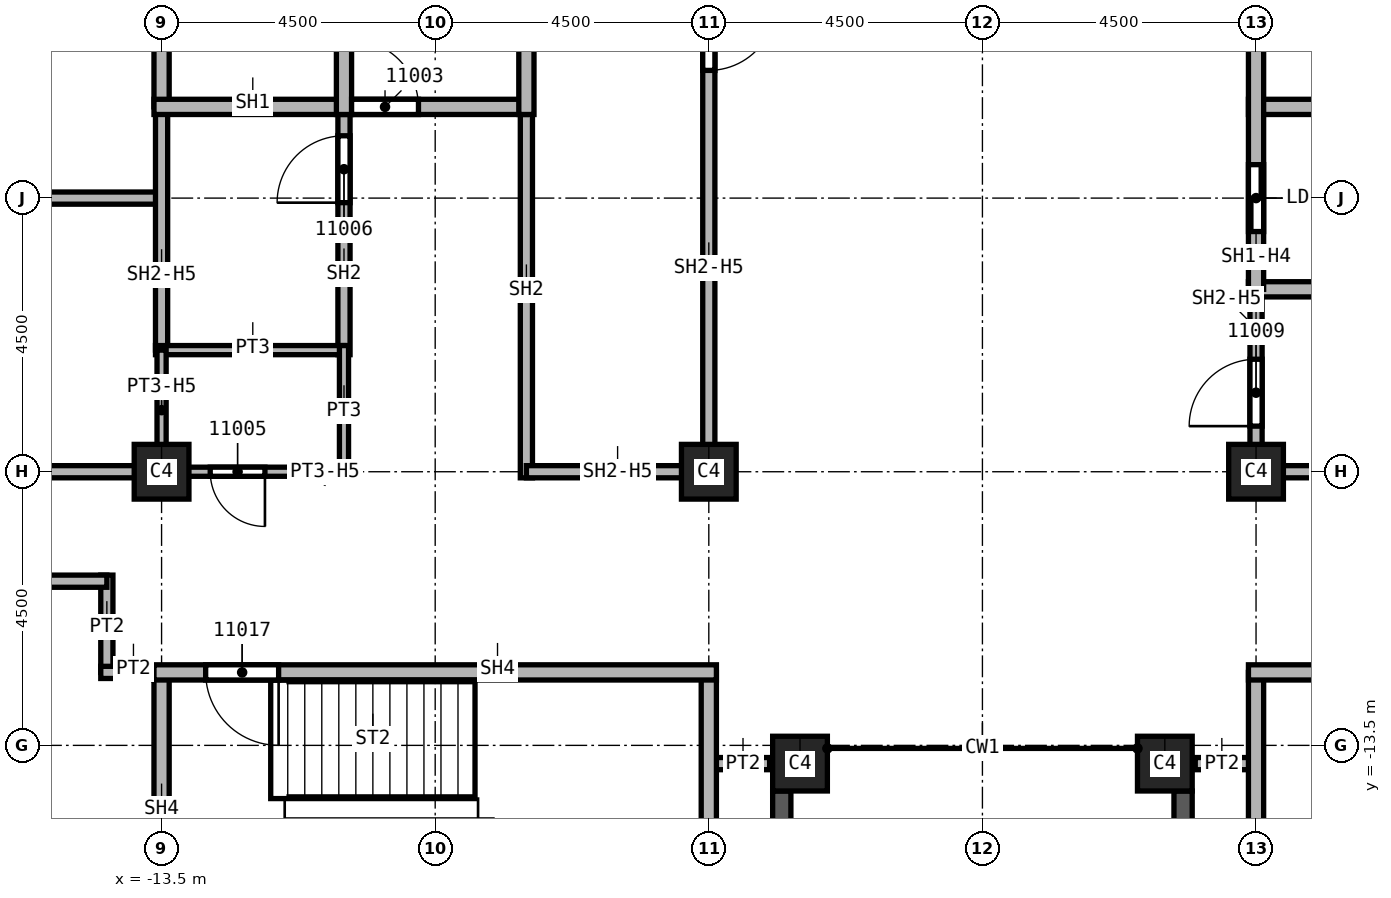
"""IFC4 building model, lengths in metres.
Left out: names, types, materials, properties, quantities, classifications, styles, units other than length and angle.
Written with IfcOpenShell. Run it as: python <this file> out.ifc"""

import sys

from ifc_helpers import new_model, si_unit, direction, frame, frame_2d, origin, origin_2d, place, context, subcontext, project, spatial, rectangle, extrude, element, fill, save


model = new_model("IFC4")
c1 = context("Model", 3, precision=1e-05, world=origin(), true_north=direction((0.0, 1.0)))
c2 = subcontext(c1, "Body", "Model", "MODEL_VIEW")
j1 = project(units=[si_unit("LENGTHUNIT", "METRE"), si_unit("PLANEANGLEUNIT", "RADIAN")], contexts=[c1])
p1 = place(None, origin())
s1 = spatial("IfcSite", under=j1, at=p1, CompositionType="ELEMENT")
p2 = place(p1, origin())
s2 = spatial("IfcBuilding", under=s1, at=p2, CompositionType="ELEMENT")
p3 = place(p2, frame((0.0, 0.0, 188.0)))
s3 = spatial("IfcBuildingStorey", under=s2, at=p3, CompositionType="ELEMENT", Elevation=188.0)
for number, where, z_axis, x_axis in (
    (1, (4.5, -9.0, 0.0), (0.0, 0.0, 1.0), (1.0, 0.0, 0.0)),
    (2, (-4.5, -9.0, 0.0), (0.0, 0.0, 1.0), (1.0, 0.0, 0.0)),
    (3, (-13.5, -9.0, 0.0), (0.0, 0.0, 1.0), (1.0, 0.0, 0.0)),
    (4, (3.0, -13.8, 0.0), (0.0, 0.0, 1.0), (1.0, 0.0, 0.0)),
    (5, (-3.0, -13.8, 0.0), (0.0, 0.0, 1.0), (1.0, 0.0, 0.0)),
):
    element("IfcColumn", number, at=place(p3, frame(where, z_axis=z_axis, x_axis=x_axis)), inside=s3, PredefinedType="COLUMN", context=c2, shape_type="SweptSolid", body=[
        extrude(rectangle(XDim=0.9, YDim=0.9, at=origin_2d()), origin(), (0.0, 0.0, 1.0), 3.72),
    ])
p4 = place(p3, frame((-3.3, -22.3, 0.0), z_axis=(0.0, 0.0, 1.0), x_axis=(0.0, 1.0, 0.0)))
e6 = element("IfcWall", 6, at=p4, inside=s3, PredefinedType="SOLIDWALL", context=c2, shape_type="SweptSolid", body=[
    extrude(rectangle(XDim=8.05, YDim=0.3, at=frame_2d((4.025, 0.0))), origin(), (0.0, 0.0, 1.0), 3.12),
])
p5 = place(p4, frame((0.812, 0.0, 0.8)))
e7 = element("IfcOpeningElement", 7, at=p5, cuts=e6, PredefinedType="OPENING", context=c2, shape_type="SweptSolid", body=[
    extrude(rectangle(XDim=2.4, YDim=1.95, at=frame_2d((1.2, 0.975))), frame((0.0, 0.15, 0.0), z_axis=(0.0, -1.0, 0.0), x_axis=(1.0, 0.0, 0.0)), (0.0, 0.0, 1.0), 0.3),
])
p6 = place(p4, frame((4.837, 0.0, 0.8)))
e8 = element("IfcOpeningElement", 8, at=p6, cuts=e6, PredefinedType="OPENING", context=c2, shape_type="SweptSolid", body=[
    extrude(rectangle(XDim=2.4, YDim=1.95, at=frame_2d((1.2, 0.975))), frame((0.0, 0.15, 0.0), z_axis=(0.0, -1.0, 0.0), x_axis=(1.0, 0.0, 0.0)), (0.0, 0.0, 1.0), 0.3),
])
p7 = place(p3, frame((3.3, -14.25, 0.0), z_axis=(0.0, 0.0, 1.0), x_axis=(0.0, -1.0, 0.0)))
e9 = element("IfcWall", 9, at=p7, inside=s3, PredefinedType="SOLIDWALL", context=c2, shape_type="SweptSolid", body=[
    extrude(rectangle(XDim=8.05, YDim=0.3, at=frame_2d((4.025, 0.0))), origin(), (0.0, 0.0, 1.0), 3.12),
])
p8 = place(p7, frame((0.812, 0.0, 0.8)))
e10 = element("IfcOpeningElement", 10, at=p8, cuts=e9, PredefinedType="OPENING", context=c2, shape_type="SweptSolid", body=[
    extrude(rectangle(XDim=2.4, YDim=1.95, at=frame_2d((1.2, 0.975))), frame((0.0, 0.15, 0.0), z_axis=(0.0, -1.0, 0.0), x_axis=(1.0, 0.0, 0.0)), (0.0, 0.0, 1.0), 0.3),
])
p9 = place(p7, frame((4.837, 0.0, 0.8)))
e11 = element("IfcOpeningElement", 11, at=p9, cuts=e9, PredefinedType="OPENING", context=c2, shape_type="SweptSolid", body=[
    extrude(rectangle(XDim=2.4, YDim=1.95, at=frame_2d((1.2, 0.975))), frame((0.0, 0.15, 0.0), z_axis=(0.0, -1.0, 0.0), x_axis=(1.0, 0.0, 0.0)), (0.0, 0.0, 1.0), 0.3),
])
for number, where, z_axis, x_axis in (
    (12, (-18.0, -9.0, 0.0), (0.0, 0.0, 1.0), (1.0, 0.0, 0.0)),
    (13, (-18.0, -4.5, 0.0), (0.0, 0.0, 1.0), (1.0, 0.0, 0.0)),
):
    element("IfcWall", number, at=place(p3, frame(where, z_axis=z_axis, x_axis=x_axis)), inside=s3, PredefinedType="PARTITIONING", context=c2, shape_type="SweptSolid", body=[
        extrude(rectangle(XDim=4.5, YDim=0.2, at=frame_2d((2.25, 0.0))), origin(), (0.0, 0.0, 1.0), 3.72),
    ])
p10 = place(p3, frame((-14.4, -12.3, 0.0), z_axis=(0.0, 0.0, 1.0), x_axis=(0.0, 1.0, 0.0)))
e14 = element("IfcWall", 14, at=p10, inside=s3, PredefinedType="PARTITIONING", context=c2, shape_type="SweptSolid", body=[
    extrude(rectangle(XDim=1.6, YDim=0.2, at=frame_2d((0.8, 0.0))), origin(), (0.0, 0.0, 1.0), 3.72),
])
p11 = place(p3, frame((-14.4, -10.8, 0.0), z_axis=(0.0, 0.0, 1.0), x_axis=(-1.0, 0.0, 0.0)))
e15 = element("IfcWall", 15, at=p11, inside=s3, PredefinedType="PARTITIONING", context=c2, shape_type="SweptSolid", body=[
    extrude(rectangle(XDim=3.6, YDim=0.2, at=frame_2d((1.8, 0.0))), origin(), (0.0, 0.0, 1.0), 3.72),
])
p12 = place(p3, frame((-13.375, -12.3, 0.0), z_axis=(0.0, 0.0, 1.0), x_axis=(-1.0, 0.0, 0.0)))
e16 = element("IfcWall", 16, at=p12, inside=s3, PredefinedType="PARTITIONING", context=c2, shape_type="SweptSolid", body=[
    extrude(rectangle(XDim=1.125, YDim=0.2, at=frame_2d((0.562, 0.0))), origin(), (0.0, 0.0, 1.0), 3.72),
])
for number, where, z_axis, x_axis in (
    (17, (-3.5, -13.8, 0.0), (0.0, 0.0, 1.0), (-1.0, 0.0, 0.0)),
    (18, (4.5, -13.8, 0.0), (0.0, 0.0, 1.0), (-1.0, 0.0, 0.0)),
):
    element("IfcWall", number, at=place(p3, frame(where, z_axis=z_axis, x_axis=x_axis)), inside=s3, PredefinedType="PARTITIONING", context=c2, shape_type="SweptSolid", body=[
        extrude(rectangle(XDim=1.0, YDim=0.2, at=frame_2d((0.5, 0.0))), origin(), (0.0, 0.0, 1.0), 3.72),
    ])
p13 = place(p3, frame((-13.5, -7.0, 0.0), z_axis=(0.0, 0.0, 1.0), x_axis=(0.0, 1.0, 0.0)))
e19 = element("IfcWall", 19, at=p13, inside=s3, PredefinedType="SOLIDWALL", context=c2, shape_type="SweptSolid", body=[
    extrude(rectangle(XDim=4.0, YDim=0.2, at=frame_2d((2.0, 0.0))), origin(), (0.0, 0.0, 1.0), 2.958),
])
p14 = place(p3, frame((-10.5, -7.075, 0.0), z_axis=(0.0, 0.0, 1.0), x_axis=(0.0, 1.0, 0.0)))
e20 = element("IfcWall", 20, at=p14, inside=s3, PredefinedType="SOLIDWALL", context=c2, shape_type="SweptSolid", body=[
    extrude(rectangle(XDim=4.2, YDim=0.2, at=frame_2d((2.1, 0.0))), origin(), (0.0, 0.0, 1.0), 3.72),
])
p15 = place(p14, frame((2.5, 0.0, 0.0)))
e21 = element("IfcOpeningElement", 21, at=p15, cuts=e20, PredefinedType="OPENING", context=c2, shape_type="SweptSolid", body=[
    extrude(rectangle(XDim=1.1, YDim=2.1, at=frame_2d((0.55, 1.05))), frame((0.0, 0.1, 0.0), z_axis=(0.0, -1.0, 0.0), x_axis=(1.0, 0.0, 0.0)), (0.0, 0.0, 1.0), 0.2),
])
p16 = place(p3, frame((-7.5, -9.1, 0.0), z_axis=(0.0, 0.0, 1.0), x_axis=(0.0, 1.0, 0.0)))
e22 = element("IfcWall", 22, at=p16, inside=s3, PredefinedType="SOLIDWALL", context=c2, shape_type="SweptSolid", body=[
    extrude(rectangle(XDim=6.225, YDim=0.2, at=frame_2d((3.113, 0.0))), origin(), (0.0, 0.0, 1.0), 3.72),
])
p17 = place(p3, frame((-4.5, -9.0, 0.0), z_axis=(0.0, 0.0, 1.0), x_axis=(-1.0, 0.0, 0.0)))
e23 = element("IfcWall", 23, at=p17, inside=s3, PredefinedType="SOLIDWALL", context=c2, shape_type="SweptSolid", body=[
    extrude(rectangle(XDim=3.0, YDim=0.2, at=frame_2d((1.5, 0.0))), origin(), (0.0, 0.0, 1.0), 2.958),
])
p18 = place(p3, frame((-4.5, 0.0, 0.0), z_axis=(0.0, 0.0, 1.0), x_axis=(0.0, -1.0, 0.0)))
e24 = element("IfcWall", 24, at=p18, inside=s3, PredefinedType="SOLIDWALL", context=c2, shape_type="SweptSolid", body=[
    extrude(rectangle(XDim=9.1, YDim=0.2, at=frame_2d((4.55, 0.0))), origin(), (0.0, 0.0, 1.0), 2.958),
])
p19 = place(p18, frame((1.3, 0.0, 0.0)))
e25 = element("IfcOpeningElement", 25, at=p19, cuts=e24, PredefinedType="OPENING", context=c2, shape_type="SweptSolid", body=[
    extrude(rectangle(XDim=1.1, YDim=2.1, at=frame_2d((0.55, 1.05))), frame((0.0, 0.1, 0.0), z_axis=(0.0, -1.0, 0.0), x_axis=(1.0, 0.0, 0.0)), (0.0, 0.0, 1.0), 0.2),
])
p20 = place(p3, frame((4.5, -9.1, 0.0), z_axis=(0.0, 0.0, 1.0), x_axis=(0.0, 1.0, 0.0)))
e26 = element("IfcWall", 26, at=p20, inside=s3, PredefinedType="SOLIDWALL", context=c2, shape_type="SweptSolid", body=[
    extrude(rectangle(XDim=3.1, YDim=0.2, at=frame_2d((1.55, 0.0))), origin(), (0.0, 0.0, 1.0), 2.958),
])
p21 = place(p20, frame((0.85, 0.0, 0.0)))
e27 = element("IfcOpeningElement", 27, at=p21, cuts=e26, PredefinedType="OPENING", context=c2, shape_type="SweptSolid", body=[
    extrude(rectangle(XDim=1.1, YDim=2.1, at=frame_2d((0.55, 1.05))), frame((0.0, 0.1, 0.0), z_axis=(0.0, -1.0, 0.0), x_axis=(1.0, 0.0, 0.0)), (0.0, 0.0, 1.0), 0.2),
])
p22 = place(p3, frame((7.5, -9.0, 0.0), z_axis=(0.0, 0.0, 1.0), x_axis=(-1.0, 0.0, 0.0)))
e28 = element("IfcWall", 28, at=p22, inside=s3, PredefinedType="SOLIDWALL", context=c2, shape_type="SweptSolid", body=[
    extrude(rectangle(XDim=3.0, YDim=0.2, at=frame_2d((1.5, 0.0))), origin(), (0.0, 0.0, 1.0), 2.958),
])
p23 = place(p3, frame((-13.5, -3.0, 0.0), z_axis=(0.0, 0.0, 1.0), x_axis=(0.0, 1.0, 0.0)))
e29 = element("IfcWall", 29, at=p23, inside=s3, PredefinedType="SOLIDWALL", context=c2, shape_type="SweptSolid", body=[
    extrude(rectangle(XDim=6.0, YDim=0.25, at=frame_2d((3.0, 0.0))), origin(), (0.0, 0.0, 1.0), 2.958),
])
p24 = place(p3, frame((-13.625, -3.0, 0.0), z_axis=(0.0, 0.0, 1.0), x_axis=(1.0, 0.0, 0.0)))
e30 = element("IfcWall", 30, at=p24, inside=s3, PredefinedType="SOLIDWALL", context=c2, shape_type="SweptSolid", body=[
    extrude(rectangle(XDim=6.125, YDim=0.25, at=frame_2d((3.062, 0.0))), origin(), (0.0, 0.0, 1.0), 3.72),
])
p25 = place(p24, frame((3.25, 0.0, 0.0)))
e31 = element("IfcOpeningElement", 31, at=p25, cuts=e30, PredefinedType="OPENING", context=c2, shape_type="SweptSolid", body=[
    extrude(rectangle(XDim=1.1, YDim=2.1, at=frame_2d((0.55, 1.05))), frame((0.0, 0.125, 0.0), z_axis=(0.0, -1.0, 0.0), x_axis=(1.0, 0.0, 0.0)), (0.0, 0.0, 1.0), 0.25),
])
p26 = place(p3, frame((-10.5, -3.125, 0.0), z_axis=(0.0, 0.0, 1.0), x_axis=(0.0, 1.0, 0.0)))
e32 = element("IfcWall", 32, at=p26, inside=s3, PredefinedType="SOLIDWALL", context=c2, shape_type="SweptSolid", body=[
    extrude(rectangle(XDim=6.25, YDim=0.25, at=frame_2d((3.125, 0.0))), origin(), (0.0, 0.0, 1.0), 3.72),
])
p27 = place(p26, frame((1.075, 0.0, 0.0)))
e33 = element("IfcOpeningElement", 33, at=p27, cuts=e32, PredefinedType="OPENING", context=c2, shape_type="SweptSolid", body=[
    extrude(rectangle(XDim=1.1, YDim=2.1, at=frame_2d((0.55, 1.05))), frame((0.0, 0.125, 0.0), z_axis=(0.0, -1.0, 0.0), x_axis=(1.0, 0.0, 0.0)), (0.0, 0.0, 1.0), 0.25),
])
p28 = place(p26, frame((4.075, 0.0, 0.0)))
e34 = element("IfcOpeningElement", 34, at=p28, cuts=e32, PredefinedType="OPENING", context=c2, shape_type="SweptSolid", body=[
    extrude(rectangle(XDim=1.1, YDim=2.1, at=frame_2d((0.55, 1.05))), frame((0.0, 0.125, 0.0), z_axis=(0.0, -1.0, 0.0), x_axis=(1.0, 0.0, 0.0)), (0.0, 0.0, 1.0), 0.25),
])
p29 = place(p3, frame((-7.5, -3.125, 0.0), z_axis=(0.0, 0.0, 1.0), x_axis=(0.0, 1.0, 0.0)))
e35 = element("IfcWall", 35, at=p29, inside=s3, PredefinedType="SOLIDWALL", context=c2, shape_type="SweptSolid", body=[
    extrude(rectangle(XDim=9.125, YDim=0.25, at=frame_2d((4.562, 0.0))), origin(), (0.0, 0.0, 1.0), 3.72),
])
p30 = place(p3, frame((4.375, -6.0, 0.0), z_axis=(0.0, 0.0, 1.0), x_axis=(1.0, 0.0, 0.0)))
e36 = element("IfcWall", 36, at=p30, inside=s3, PredefinedType="SOLIDWALL", context=c2, shape_type="SweptSolid", body=[
    extrude(rectangle(XDim=3.25, YDim=0.25, at=frame_2d((1.625, 0.0))), origin(), (0.0, 0.0, 1.0), 3.72),
])
p31 = place(p3, frame((4.375, -3.0, 0.0), z_axis=(0.0, 0.0, 1.0), x_axis=(1.0, 0.0, 0.0)))
e37 = element("IfcWall", 37, at=p31, inside=s3, PredefinedType="SOLIDWALL", context=c2, shape_type="SweptSolid", body=[
    extrude(rectangle(XDim=9.25, YDim=0.25, at=frame_2d((4.625, 0.0))), origin(), (0.0, 0.0, 1.0), 3.72),
])
p32 = place(p31, frame((4.125, 0.0, 0.0)))
e38 = element("IfcOpeningElement", 38, at=p32, cuts=e37, PredefinedType="OPENING", context=c2, shape_type="SweptSolid", body=[
    extrude(rectangle(XDim=1.1, YDim=2.1, at=frame_2d((0.55, 1.05))), frame((0.0, 0.125, 0.0), z_axis=(0.0, -1.0, 0.0), x_axis=(1.0, 0.0, 0.0)), (0.0, 0.0, 1.0), 0.25),
])
p33 = place(p3, frame((4.5, -6.0, 0.0), z_axis=(0.0, 0.0, 1.0), x_axis=(0.0, 1.0, 0.0)))
e39 = element("IfcWall", 39, at=p33, inside=s3, PredefinedType="SOLIDWALL", context=c2, shape_type="SweptSolid", body=[
    extrude(rectangle(XDim=6.0, YDim=0.25, at=frame_2d((3.0, 0.0))), origin(), (0.0, 0.0, 1.0), 2.958),
])
p34 = place(p33, frame((0.95, 0.0, 0.0)))
e40 = element("IfcOpeningElement", 40, at=p34, cuts=e39, PredefinedType="OPENING", context=c2, shape_type="SweptSolid", body=[
    extrude(rectangle(XDim=1.1, YDim=2.1, at=frame_2d((0.55, 1.05))), frame((0.0, 0.125, 0.0), z_axis=(0.0, -1.0, 0.0), x_axis=(1.0, 0.0, 0.0)), (0.0, 0.0, 1.0), 0.25),
])
p35 = place(p33, frame((3.95, 0.0, 0.0)))
e41 = element("IfcOpeningElement", 41, at=p35, cuts=e39, PredefinedType="OPENING", context=c2, shape_type="SweptSolid", body=[
    extrude(rectangle(XDim=1.1, YDim=2.1, at=frame_2d((0.55, 1.05))), frame((0.0, 0.125, 0.0), z_axis=(0.0, -1.0, 0.0), x_axis=(1.0, 0.0, 0.0)), (0.0, 0.0, 1.0), 0.25),
])
p36 = place(p3, frame((-13.5, -16.8, 0.0), z_axis=(0.0, 0.0, 1.0), x_axis=(0.0, 1.0, 0.0)))
e42 = element("IfcWall", 42, at=p36, inside=s3, PredefinedType="SOLIDWALL", context=c2, shape_type="SweptSolid", body=[
    extrude(rectangle(XDim=4.5, YDim=0.25, at=frame_2d((2.25, 0.0))), origin(), (0.0, 0.0, 1.0), 3.72),
])
p37 = place(p3, frame((-4.5, -12.3, 0.0), z_axis=(0.0, 0.0, 1.0), x_axis=(0.0, -1.0, 0.0)))
e43 = element("IfcWall", 43, at=p37, inside=s3, PredefinedType="SOLIDWALL", context=c2, shape_type="SweptSolid", body=[
    extrude(rectangle(XDim=4.625, YDim=0.25, at=frame_2d((2.312, 0.0))), origin(), (0.0, 0.0, 1.0), 3.72),
])
p38 = place(p3, frame((-4.375, -12.3, 0.0), z_axis=(0.0, 0.0, 1.0), x_axis=(-1.0, 0.0, 0.0)))
e44 = element("IfcWall", 44, at=p38, inside=s3, PredefinedType="SOLIDWALL", context=c2, shape_type="SweptSolid", body=[
    extrude(rectangle(XDim=9.25, YDim=0.25, at=frame_2d((4.625, 0.0))), origin(), (0.0, 0.0, 1.0), 3.72),
])
p39 = place(p38, frame((7.2, 0.0, 0.0)))
e45 = element("IfcOpeningElement", 45, at=p39, cuts=e44, PredefinedType="OPENING", context=c2, shape_type="SweptSolid", body=[
    extrude(rectangle(XDim=1.2, YDim=2.1, at=frame_2d((0.6, 1.05))), frame((0.0, 0.125, 0.0), z_axis=(0.0, -1.0, 0.0), x_axis=(1.0, 0.0, 0.0)), (0.0, 0.0, 1.0), 0.25),
])
p40 = place(p3, frame((4.5, -16.8, 0.0), z_axis=(0.0, 0.0, 1.0), x_axis=(0.0, 1.0, 0.0)))
e46 = element("IfcWall", 46, at=p40, inside=s3, PredefinedType="SOLIDWALL", context=c2, shape_type="SweptSolid", body=[
    extrude(rectangle(XDim=4.5, YDim=0.25, at=frame_2d((2.25, 0.0))), origin(), (0.0, 0.0, 1.0), 3.72),
])
p41 = place(p3, frame((13.625, -12.3, 0.0), z_axis=(0.0, 0.0, 1.0), x_axis=(-1.0, 0.0, 0.0)))
e47 = element("IfcWall", 47, at=p41, inside=s3, PredefinedType="SOLIDWALL", context=c2, shape_type="SweptSolid", body=[
    extrude(rectangle(XDim=9.25, YDim=0.25, at=frame_2d((4.625, 0.0))), origin(), (0.0, 0.0, 1.0), 3.72),
])
p42 = place(p41, frame((0.85, 0.0, 0.0)))
e48 = element("IfcOpeningElement", 48, at=p42, cuts=e47, PredefinedType="OPENING", context=c2, shape_type="SweptSolid", body=[
    extrude(rectangle(XDim=1.2, YDim=2.1, at=frame_2d((0.6, 1.05))), frame((0.0, 0.125, 0.0), z_axis=(0.0, -1.0, 0.0), x_axis=(1.0, 0.0, 0.0)), (0.0, 0.0, 1.0), 0.25),
])
p43 = place(p3, frame((-13.6, -7.0, 0.0), z_axis=(0.0, 0.0, 1.0), x_axis=(1.0, 0.0, 0.0)))
e49 = element("IfcWall", 49, at=p43, inside=s3, PredefinedType="PARTITIONING", context=c2, shape_type="SweptSolid", body=[
    extrude(rectangle(XDim=3.1, YDim=0.15, at=frame_2d((1.55, 0.0))), origin(), (0.0, 0.0, 1.0), 3.72),
])
p44 = place(p3, frame((-13.5, -9.1, 0.0), z_axis=(0.0, 0.0, 1.0), x_axis=(0.0, 1.0, 0.0)))
e50 = element("IfcWall", 50, at=p44, inside=s3, PredefinedType="PARTITIONING", context=c2, shape_type="SweptSolid", body=[
    extrude(rectangle(XDim=2.1, YDim=0.15, at=frame_2d((1.05, 0.0))), origin(), (0.0, 0.0, 1.0), 2.958),
])
p45 = place(p3, frame((-10.5, -9.075, 0.0), z_axis=(0.0, 0.0, 1.0), x_axis=(0.0, 1.0, 0.0)))
e51 = element("IfcWall", 51, at=p45, inside=s3, PredefinedType="PARTITIONING", context=c2, shape_type="SweptSolid", body=[
    extrude(rectangle(XDim=2.15, YDim=0.15, at=frame_2d((1.075, 0.0))), origin(), (0.0, 0.0, 1.0), 3.72),
])
p46 = place(p3, frame((-10.5, -9.0, 0.0), z_axis=(0.0, 0.0, 1.0), x_axis=(-1.0, 0.0, 0.0)))
e52 = element("IfcWall", 52, at=p46, inside=s3, PredefinedType="PARTITIONING", context=c2, shape_type="SweptSolid", body=[
    extrude(rectangle(XDim=3.075, YDim=0.15, at=frame_2d((1.538, 0.0))), origin(), (0.0, 0.0, 1.0), 2.958),
])
p47 = place(p46, frame((1.3, 0.0, 0.0)))
e53 = element("IfcOpeningElement", 53, at=p47, cuts=e52, PredefinedType="OPENING", context=c2, shape_type="SweptSolid", body=[
    extrude(rectangle(XDim=0.9, YDim=2.1, at=frame_2d((0.45, 1.05))), frame((0.0, 0.075, 0.0), z_axis=(0.0, -1.0, 0.0), x_axis=(1.0, 0.0, 0.0)), (0.0, 0.0, 1.0), 0.15),
])
p48 = place(p19, origin())
e54 = element("IfcDoor", 54, at=p48, inside=s3, OperationType="SINGLE_SWING_RIGHT", PredefinedType="DOOR", context=c2, shape_type="SweptSolid", body=[
    extrude(rectangle(XDim=1.1, YDim=2.1, at=frame_2d((0.55, 1.05))), frame((0.0, 0.025, 0.0), z_axis=(0.0, -1.0, 0.0), x_axis=(1.0, 0.0, 0.0)), (0.0, 0.0, 1.0), 0.05),
])
fill(e25, e54)
p49 = place(p25, origin())
e55 = element("IfcDoor", 55, at=p49, inside=s3, OperationType="SINGLE_SWING_RIGHT", PredefinedType="DOOR", context=c2, shape_type="SweptSolid", body=[
    extrude(rectangle(XDim=1.1, YDim=2.1, at=frame_2d((0.55, 1.05))), frame((0.0, 0.025, 0.0), z_axis=(0.0, -1.0, 0.0), x_axis=(1.0, 0.0, 0.0)), (0.0, 0.0, 1.0), 0.05),
])
fill(e31, e55)
p50 = place(p47, origin())
e56 = element("IfcDoor", 56, at=p50, inside=s3, OperationType="SINGLE_SWING_RIGHT", PredefinedType="DOOR", context=c2, shape_type="SweptSolid", body=[
    extrude(rectangle(XDim=0.9, YDim=2.1, at=frame_2d((0.45, 1.05))), frame((0.0, 0.025, 0.0), z_axis=(0.0, -1.0, 0.0), x_axis=(1.0, 0.0, 0.0)), (0.0, 0.0, 1.0), 0.05),
])
fill(e53, e56)
p51 = place(p15, origin())
e57 = element("IfcDoor", 57, at=p51, inside=s3, OperationType="SINGLE_SWING_LEFT", PredefinedType="DOOR", context=c2, shape_type="SweptSolid", body=[
    extrude(rectangle(XDim=1.1, YDim=2.1, at=frame_2d((0.55, 1.05))), frame((0.0, 0.025, 0.0), z_axis=(0.0, -1.0, 0.0), x_axis=(1.0, 0.0, 0.0)), (0.0, 0.0, 1.0), 0.05),
])
fill(e21, e57)
p52 = place(p21, origin())
e58 = element("IfcDoor", 58, at=p52, inside=s3, OperationType="SINGLE_SWING_RIGHT", PredefinedType="DOOR", context=c2, shape_type="SweptSolid", body=[
    extrude(rectangle(XDim=1.1, YDim=2.1, at=frame_2d((0.55, 1.05))), frame((0.0, 0.025, 0.0), z_axis=(0.0, -1.0, 0.0), x_axis=(1.0, 0.0, 0.0)), (0.0, 0.0, 1.0), 0.05),
])
fill(e27, e58)
p53 = place(p39, origin())
e59 = element("IfcDoor", 59, at=p53, inside=s3, OperationType="SINGLE_SWING_RIGHT", PredefinedType="DOOR", context=c2, shape_type="SweptSolid", body=[
    extrude(rectangle(XDim=1.2, YDim=2.1, at=frame_2d((0.6, 1.05))), frame((0.0, 0.025, 0.0), z_axis=(0.0, -1.0, 0.0), x_axis=(1.0, 0.0, 0.0)), (0.0, 0.0, 1.0), 0.05),
])
fill(e45, e59)
p54 = place(p34, origin())
e60 = element("IfcDoor", 60, at=p54, inside=s3, OperationType="SLIDING_TO_LEFT", PredefinedType="DOOR", context=c2, shape_type="SweptSolid", body=[
    extrude(rectangle(XDim=1.1, YDim=2.1, at=frame_2d((0.55, 1.05))), frame((0.0, 0.025, 0.0), z_axis=(0.0, -1.0, 0.0), x_axis=(1.0, 0.0, 0.0)), (0.0, 0.0, 1.0), 0.05),
])
fill(e40, e60)
save(model, sys.argv[1])
